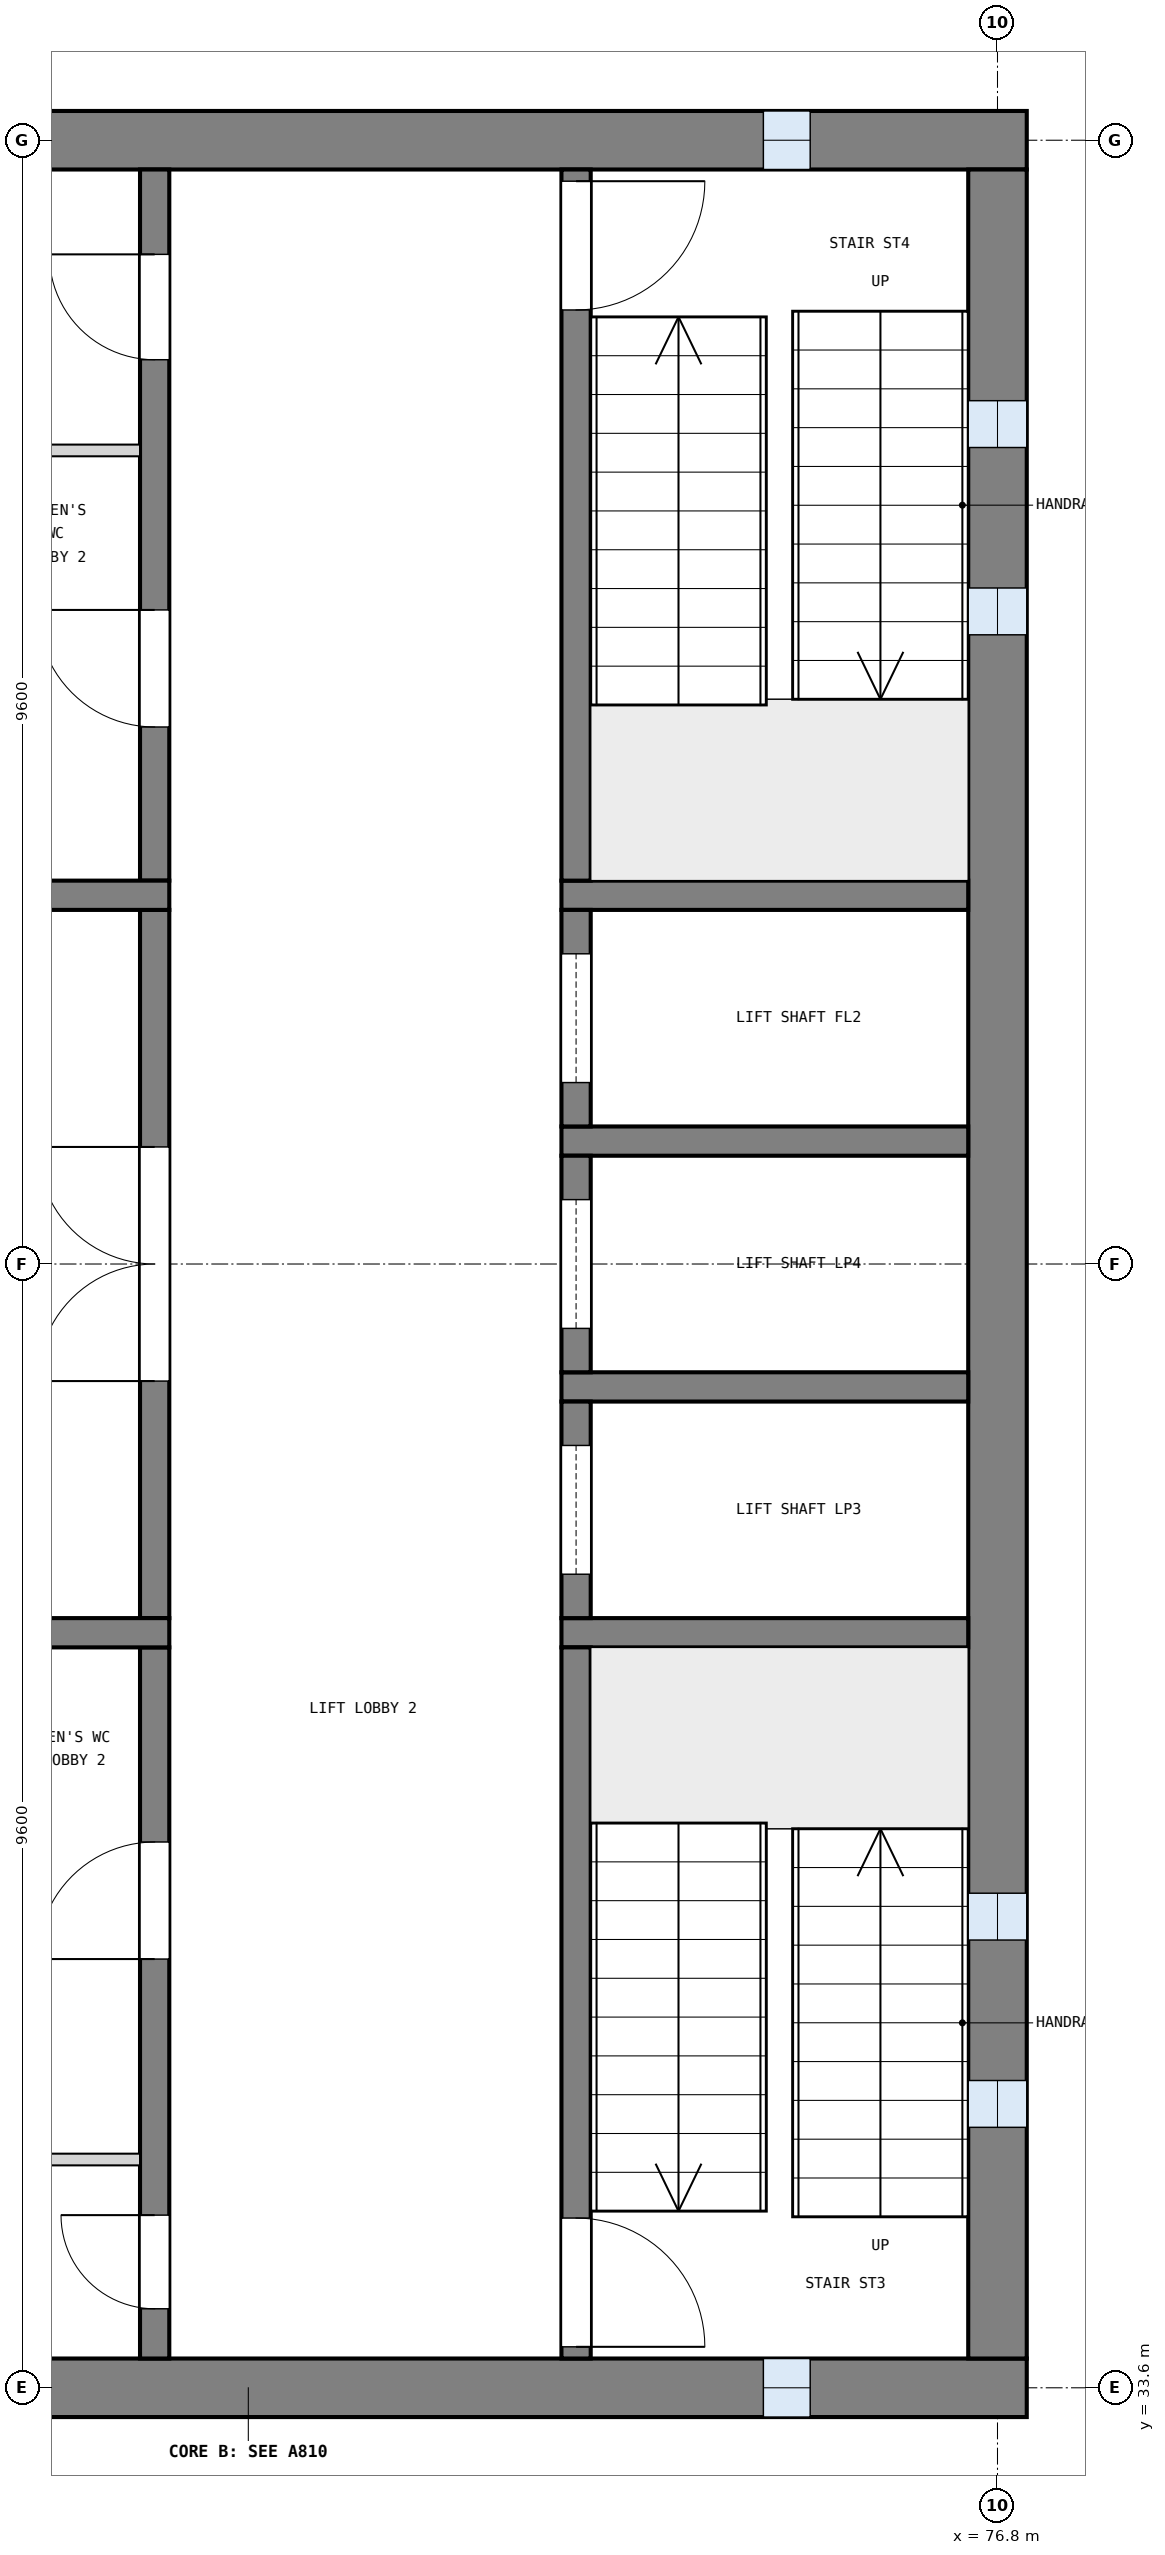
"""IFC4 building model, lengths in metres.
Left out: names, types, materials, properties, quantities, classifications, styles, units other than length and angle.
Written with IfcOpenShell. Run it as: python <this file> out.ifc"""

import sys

from ifc_helpers import new_model, si_unit, direction, frame, frame_2d, origin, place, context, subcontext, project, spatial, rectangle, extrude, element, fill, save


model = new_model("IFC4")
c1 = context("Model", 3, precision=1e-05, world=origin(), true_north=direction((0.0, 1.0)))
c2 = subcontext(c1, "Body", "Model", "MODEL_VIEW")
j1 = project(units=[si_unit("LENGTHUNIT", "METRE"), si_unit("PLANEANGLEUNIT", "RADIAN")], contexts=[c1])
p1 = place(None, origin())
s1 = spatial("IfcSite", under=j1, at=p1, CompositionType="ELEMENT")
p2 = place(p1, origin())
s2 = spatial("IfcBuilding", under=s1, at=p2, CompositionType="ELEMENT")
p3 = place(p2, frame((0.0, 0.0, 32.7)))
s3 = spatial("IfcBuildingStorey", under=s2, at=p3, CompositionType="ELEMENT", Elevation=32.7)
p4 = place(p3, frame((63.75, 52.8, 0.0), z_axis=(0.0, 0.0, 1.0), x_axis=(1.0, 0.0, 0.0)))
e1 = element("IfcWall", 1, at=p4, inside=s3, PredefinedType="SHEAR", context=c2, shape_type="SweptSolid", body=[
    extrude(rectangle(XDim=13.3, YDim=0.5, at=frame_2d((6.65, 0.0))), origin(), (0.0, 0.0, 1.0), 3.9),
])
p5 = place(p4, frame((11.05, 0.0, 1.0)))
e2 = element("IfcOpeningElement", 2, at=p5, cuts=e1, PredefinedType="OPENING", context=c2, shape_type="SweptSolid", body=[
    extrude(rectangle(XDim=0.4, YDim=2.0, at=frame_2d((0.2, 1.0))), frame((0.0, 0.26, 0.0), z_axis=(0.0, -1.0, 0.0), x_axis=(1.0, 0.0, 0.0)), (0.0, 0.0, 1.0), 0.52),
])
p6 = place(p3, frame((63.75, 33.6, 0.0), z_axis=(0.0, 0.0, 1.0), x_axis=(1.0, 0.0, 0.0)))
e3 = element("IfcWall", 3, at=p6, inside=s3, PredefinedType="SHEAR", context=c2, shape_type="SweptSolid", body=[
    extrude(rectangle(XDim=13.3, YDim=0.5, at=frame_2d((6.65, 0.0))), origin(), (0.0, 0.0, 1.0), 3.9),
])
p7 = place(p6, frame((11.05, 0.0, 1.0)))
e4 = element("IfcOpeningElement", 4, at=p7, cuts=e3, PredefinedType="OPENING", context=c2, shape_type="SweptSolid", body=[
    extrude(rectangle(XDim=0.4, YDim=2.0, at=frame_2d((0.2, 1.0))), frame((0.0, 0.26, 0.0), z_axis=(0.0, -1.0, 0.0), x_axis=(1.0, 0.0, 0.0)), (0.0, 0.0, 1.0), 0.52),
])
p8 = place(p3, frame((76.8, 33.85, 0.0), z_axis=(0.0, 0.0, 1.0), x_axis=(0.0, 1.0, 0.0)))
e5 = element("IfcWall", 5, at=p8, inside=s3, PredefinedType="SHEAR", context=c2, shape_type="SweptSolid", body=[
    extrude(rectangle(XDim=18.7, YDim=0.5, at=frame_2d((9.35, 0.0))), origin(), (0.0, 0.0, 1.0), 3.9),
])
p9 = place(p8, frame((1.975, 0.0, 1.0)))
e6 = element("IfcOpeningElement", 6, at=p9, cuts=e5, PredefinedType="OPENING", context=c2, shape_type="SweptSolid", body=[
    extrude(rectangle(XDim=0.4, YDim=2.0, at=frame_2d((0.2, 1.0))), frame((0.0, 0.26, 0.0), z_axis=(0.0, -1.0, 0.0), x_axis=(1.0, 0.0, 0.0)), (0.0, 0.0, 1.0), 0.52),
])
p10 = place(p8, frame((3.575, 0.0, 1.0)))
e7 = element("IfcOpeningElement", 7, at=p10, cuts=e5, PredefinedType="OPENING", context=c2, shape_type="SweptSolid", body=[
    extrude(rectangle(XDim=0.4, YDim=2.0, at=frame_2d((0.2, 1.0))), frame((0.0, 0.26, 0.0), z_axis=(0.0, -1.0, 0.0), x_axis=(1.0, 0.0, 0.0)), (0.0, 0.0, 1.0), 0.52),
])
p11 = place(p8, frame((14.725, 0.0, 1.0)))
e8 = element("IfcOpeningElement", 8, at=p11, cuts=e5, PredefinedType="OPENING", context=c2, shape_type="SweptSolid", body=[
    extrude(rectangle(XDim=0.4, YDim=2.0, at=frame_2d((0.2, 1.0))), frame((0.0, 0.26, 0.0), z_axis=(0.0, -1.0, 0.0), x_axis=(1.0, 0.0, 0.0)), (0.0, 0.0, 1.0), 0.52),
])
p12 = place(p8, frame((16.325, 0.0, 1.0)))
e9 = element("IfcOpeningElement", 9, at=p12, cuts=e5, PredefinedType="OPENING", context=c2, shape_type="SweptSolid", body=[
    extrude(rectangle(XDim=0.4, YDim=2.0, at=frame_2d((0.2, 1.0))), frame((0.0, 0.26, 0.0), z_axis=(0.0, -1.0, 0.0), x_axis=(1.0, 0.0, 0.0)), (0.0, 0.0, 1.0), 0.52),
])
for number, where, z_axis, x_axis in (
    (10, (76.55, 40.05, 0.0), (0.0, 0.0, 1.0), (-1.0, 0.0, 0.0)),
    (11, (76.55, 42.15, 0.0), (0.0, 0.0, 1.0), (-1.0, 0.0, 0.0)),
    (12, (76.55, 44.25, 0.0), (0.0, 0.0, 1.0), (-1.0, 0.0, 0.0)),
    (13, (76.55, 46.35, 0.0), (0.0, 0.0, 1.0), (-1.0, 0.0, 0.0)),
):
    element("IfcWall", number, at=place(p3, frame(where, z_axis=z_axis, x_axis=x_axis)), inside=s3, PredefinedType="SOLIDWALL", context=c2, shape_type="SweptSolid", body=[
        extrude(rectangle(XDim=3.475, YDim=0.25, at=frame_2d((1.738, 0.0))), origin(), (0.0, 0.0, 1.0), 3.6),
    ])
p13 = place(p3, frame((73.2, 33.85, 0.0), z_axis=(0.0, 0.0, 1.0), x_axis=(0.0, 1.0, 0.0)))
e14 = element("IfcWall", 14, at=p13, inside=s3, PredefinedType="SOLIDWALL", context=c2, shape_type="SweptSolid", body=[
    extrude(rectangle(XDim=6.075, YDim=0.25, at=frame_2d((3.038, 0.0))), origin(), (0.0, 0.0, 1.0), 3.6),
])
p14 = place(p13, frame((0.1, 0.0, 0.0)))
e15 = element("IfcOpeningElement", 15, at=p14, cuts=e14, PredefinedType="OPENING", context=c2, shape_type="SweptSolid", body=[
    extrude(rectangle(XDim=1.1, YDim=2.1, at=frame_2d((0.55, 1.05))), frame((0.0, 0.135, 0.0), z_axis=(0.0, -1.0, 0.0), x_axis=(1.0, 0.0, 0.0)), (0.0, 0.0, 1.0), 0.27),
])
p15 = place(p3, frame((73.2, 40.175, 0.0), z_axis=(0.0, 0.0, 1.0), x_axis=(0.0, 1.0, 0.0)))
e16 = element("IfcWall", 16, at=p15, inside=s3, PredefinedType="SOLIDWALL", context=c2, shape_type="SweptSolid", body=[
    extrude(rectangle(XDim=1.85, YDim=0.25, at=frame_2d((0.925, 0.0))), origin(), (0.0, 0.0, 1.0), 3.6),
])
p16 = place(p15, frame((0.375, 0.0, 0.0)))
e17 = element("IfcOpeningElement", 17, at=p16, cuts=e16, PredefinedType="OPENING", context=c2, shape_type="SweptSolid", body=[
    extrude(rectangle(XDim=1.1, YDim=2.1, at=frame_2d((0.55, 1.05))), frame((0.0, 0.135, 0.0), z_axis=(0.0, -1.0, 0.0), x_axis=(1.0, 0.0, 0.0)), (0.0, 0.0, 1.0), 0.27),
])
p17 = place(p3, frame((73.2, 42.275, 0.0), z_axis=(0.0, 0.0, 1.0), x_axis=(0.0, 1.0, 0.0)))
e18 = element("IfcWall", 18, at=p17, inside=s3, PredefinedType="SOLIDWALL", context=c2, shape_type="SweptSolid", body=[
    extrude(rectangle(XDim=1.85, YDim=0.25, at=frame_2d((0.925, 0.0))), origin(), (0.0, 0.0, 1.0), 3.6),
])
p18 = place(p17, frame((0.375, 0.0, 0.0)))
e19 = element("IfcOpeningElement", 19, at=p18, cuts=e18, PredefinedType="OPENING", context=c2, shape_type="SweptSolid", body=[
    extrude(rectangle(XDim=1.1, YDim=2.1, at=frame_2d((0.55, 1.05))), frame((0.0, 0.135, 0.0), z_axis=(0.0, -1.0, 0.0), x_axis=(1.0, 0.0, 0.0)), (0.0, 0.0, 1.0), 0.27),
])
p19 = place(p3, frame((73.2, 44.375, 0.0), z_axis=(0.0, 0.0, 1.0), x_axis=(0.0, 1.0, 0.0)))
e20 = element("IfcWall", 20, at=p19, inside=s3, PredefinedType="SOLIDWALL", context=c2, shape_type="SweptSolid", body=[
    extrude(rectangle(XDim=1.85, YDim=0.25, at=frame_2d((0.925, 0.0))), origin(), (0.0, 0.0, 1.0), 3.6),
])
p20 = place(p19, frame((0.375, 0.0, 0.0)))
e21 = element("IfcOpeningElement", 21, at=p20, cuts=e20, PredefinedType="OPENING", context=c2, shape_type="SweptSolid", body=[
    extrude(rectangle(XDim=1.1, YDim=2.1, at=frame_2d((0.55, 1.05))), frame((0.0, 0.135, 0.0), z_axis=(0.0, -1.0, 0.0), x_axis=(1.0, 0.0, 0.0)), (0.0, 0.0, 1.0), 0.27),
])
p21 = place(p3, frame((73.2, 46.475, 0.0), z_axis=(0.0, 0.0, 1.0), x_axis=(0.0, 1.0, 0.0)))
e22 = element("IfcWall", 22, at=p21, inside=s3, PredefinedType="SOLIDWALL", context=c2, shape_type="SweptSolid", body=[
    extrude(rectangle(XDim=6.075, YDim=0.25, at=frame_2d((3.038, 0.0))), origin(), (0.0, 0.0, 1.0), 3.6),
])
p22 = place(p21, frame((4.875, 0.0, 0.0)))
e23 = element("IfcOpeningElement", 23, at=p22, cuts=e22, PredefinedType="OPENING", context=c2, shape_type="SweptSolid", body=[
    extrude(rectangle(XDim=1.1, YDim=2.1, at=frame_2d((0.55, 1.05))), frame((0.0, 0.135, 0.0), z_axis=(0.0, -1.0, 0.0), x_axis=(1.0, 0.0, 0.0)), (0.0, 0.0, 1.0), 0.27),
])
p23 = place(p3, frame((69.6, 33.85, 0.0), z_axis=(0.0, 0.0, 1.0), x_axis=(0.0, 1.0, 0.0)))
e24 = element("IfcWall", 24, at=p23, inside=s3, PredefinedType="SOLIDWALL", context=c2, shape_type="SweptSolid", body=[
    extrude(rectangle(XDim=6.075, YDim=0.25, at=frame_2d((3.038, 0.0))), origin(), (0.0, 0.0, 1.0), 3.6),
])
p24 = place(p23, frame((0.425, 0.0, 0.0)))
e25 = element("IfcOpeningElement", 25, at=p24, cuts=e24, PredefinedType="OPENING", context=c2, shape_type="SweptSolid", body=[
    extrude(rectangle(XDim=0.8, YDim=2.1, at=frame_2d((0.4, 1.05))), frame((0.0, 0.135, 0.0), z_axis=(0.0, -1.0, 0.0), x_axis=(1.0, 0.0, 0.0)), (0.0, 0.0, 1.0), 0.27),
])
p25 = place(p23, frame((3.413, 0.0, 0.0)))
e26 = element("IfcOpeningElement", 26, at=p25, cuts=e24, PredefinedType="OPENING", context=c2, shape_type="SweptSolid", body=[
    extrude(rectangle(XDim=1.0, YDim=2.1, at=frame_2d((0.5, 1.05))), frame((0.0, 0.135, 0.0), z_axis=(0.0, -1.0, 0.0), x_axis=(1.0, 0.0, 0.0)), (0.0, 0.0, 1.0), 0.27),
])
p26 = place(p3, frame((69.6, 40.175, 0.0), z_axis=(0.0, 0.0, 1.0), x_axis=(0.0, 1.0, 0.0)))
e27 = element("IfcWall", 27, at=p26, inside=s3, PredefinedType="SOLIDWALL", context=c2, shape_type="SweptSolid", body=[
    extrude(rectangle(XDim=6.05, YDim=0.25, at=frame_2d((3.025, 0.0))), origin(), (0.0, 0.0, 1.0), 3.6),
])
p27 = place(p26, frame((2.025, 0.0, 0.0)))
e28 = element("IfcOpeningElement", 28, at=p27, cuts=e27, PredefinedType="OPENING", context=c2, shape_type="SweptSolid", body=[
    extrude(rectangle(XDim=2.0, YDim=2.1, at=frame_2d((1.0, 1.05))), frame((0.0, 0.135, 0.0), z_axis=(0.0, -1.0, 0.0), x_axis=(1.0, 0.0, 0.0)), (0.0, 0.0, 1.0), 0.27),
])
p28 = place(p3, frame((69.6, 46.475, 0.0), z_axis=(0.0, 0.0, 1.0), x_axis=(0.0, 1.0, 0.0)))
e29 = element("IfcWall", 29, at=p28, inside=s3, PredefinedType="SOLIDWALL", context=c2, shape_type="SweptSolid", body=[
    extrude(rectangle(XDim=6.075, YDim=0.25, at=frame_2d((3.038, 0.0))), origin(), (0.0, 0.0, 1.0), 3.6),
])
p29 = place(p28, frame((1.312, 0.0, 0.0)))
e30 = element("IfcOpeningElement", 30, at=p29, cuts=e29, PredefinedType="OPENING", context=c2, shape_type="SweptSolid", body=[
    extrude(rectangle(XDim=1.0, YDim=2.1, at=frame_2d((0.5, 1.05))), frame((0.0, 0.135, 0.0), z_axis=(0.0, -1.0, 0.0), x_axis=(1.0, 0.0, 0.0)), (0.0, 0.0, 1.0), 0.27),
])
p30 = place(p28, frame((4.45, 0.0, 0.0)))
e31 = element("IfcOpeningElement", 31, at=p30, cuts=e29, PredefinedType="OPENING", context=c2, shape_type="SweptSolid", body=[
    extrude(rectangle(XDim=0.9, YDim=2.1, at=frame_2d((0.45, 1.05))), frame((0.0, 0.135, 0.0), z_axis=(0.0, -1.0, 0.0), x_axis=(1.0, 0.0, 0.0)), (0.0, 0.0, 1.0), 0.27),
])
for number, where, z_axis, x_axis in (
    (32, (69.725, 40.05, 0.0), (0.0, 0.0, 1.0), (-1.0, 0.0, 0.0)),
    (33, (69.725, 46.35, 0.0), (0.0, 0.0, 1.0), (-1.0, 0.0, 0.0)),
):
    element("IfcWall", number, at=place(p3, frame(where, z_axis=z_axis, x_axis=x_axis)), inside=s3, PredefinedType="SOLIDWALL", context=c2, shape_type="SweptSolid", body=[
        extrude(rectangle(XDim=5.475, YDim=0.25, at=frame_2d((2.738, 0.0))), origin(), (0.0, 0.0, 1.0), 3.6),
    ])
for number, where, z_axis, x_axis in (
    (34, (69.475, 35.55, 0.0), (0.0, 0.0, 1.0), (-1.0, 0.0, 0.0)),
    (35, (69.475, 50.15, 0.0), (0.0, 0.0, 1.0), (-1.0, 0.0, 0.0)),
):
    element("IfcWall", number, at=place(p3, frame(where, z_axis=z_axis, x_axis=x_axis)), inside=s3, PredefinedType="PARTITIONING", context=c2, shape_type="SweptSolid", body=[
        extrude(rectangle(XDim=5.225, YDim=0.1, at=frame_2d((2.613, 0.0))), origin(), (0.0, 0.0, 1.0), 3.6),
    ])
p31 = place(p9, origin())
e36 = element("IfcWindow", 36, at=p31, inside=s3, PartitioningType="SINGLE_PANEL", PredefinedType="WINDOW", context=c2, shape_type="SweptSolid", body=[
    extrude(rectangle(XDim=0.4, YDim=2.0, at=frame_2d((0.2, 1.0))), frame((0.0, 0.03, 0.0), z_axis=(0.0, -1.0, 0.0), x_axis=(1.0, 0.0, 0.0)), (0.0, 0.0, 1.0), 0.06),
])
fill(e6, e36)
p32 = place(p10, origin())
e37 = element("IfcWindow", 37, at=p32, inside=s3, PartitioningType="SINGLE_PANEL", PredefinedType="WINDOW", context=c2, shape_type="SweptSolid", body=[
    extrude(rectangle(XDim=0.4, YDim=2.0, at=frame_2d((0.2, 1.0))), frame((0.0, 0.03, 0.0), z_axis=(0.0, -1.0, 0.0), x_axis=(1.0, 0.0, 0.0)), (0.0, 0.0, 1.0), 0.06),
])
fill(e7, e37)
p33 = place(p11, origin())
e38 = element("IfcWindow", 38, at=p33, inside=s3, PartitioningType="SINGLE_PANEL", PredefinedType="WINDOW", context=c2, shape_type="SweptSolid", body=[
    extrude(rectangle(XDim=0.4, YDim=2.0, at=frame_2d((0.2, 1.0))), frame((0.0, 0.03, 0.0), z_axis=(0.0, -1.0, 0.0), x_axis=(1.0, 0.0, 0.0)), (0.0, 0.0, 1.0), 0.06),
])
fill(e8, e38)
p34 = place(p12, origin())
e39 = element("IfcWindow", 39, at=p34, inside=s3, PartitioningType="SINGLE_PANEL", PredefinedType="WINDOW", context=c2, shape_type="SweptSolid", body=[
    extrude(rectangle(XDim=0.4, YDim=2.0, at=frame_2d((0.2, 1.0))), frame((0.0, 0.03, 0.0), z_axis=(0.0, -1.0, 0.0), x_axis=(1.0, 0.0, 0.0)), (0.0, 0.0, 1.0), 0.06),
])
fill(e9, e39)
p35 = place(p7, origin())
e40 = element("IfcWindow", 40, at=p35, inside=s3, PartitioningType="SINGLE_PANEL", PredefinedType="WINDOW", context=c2, shape_type="SweptSolid", body=[
    extrude(rectangle(XDim=0.4, YDim=2.0, at=frame_2d((0.2, 1.0))), frame((0.0, 0.03, 0.0), z_axis=(0.0, -1.0, 0.0), x_axis=(1.0, 0.0, 0.0)), (0.0, 0.0, 1.0), 0.06),
])
fill(e4, e40)
p36 = place(p5, origin())
e41 = element("IfcWindow", 41, at=p36, inside=s3, PartitioningType="SINGLE_PANEL", PredefinedType="WINDOW", context=c2, shape_type="SweptSolid", body=[
    extrude(rectangle(XDim=0.4, YDim=2.0, at=frame_2d((0.2, 1.0))), frame((0.0, 0.03, 0.0), z_axis=(0.0, -1.0, 0.0), x_axis=(1.0, 0.0, 0.0)), (0.0, 0.0, 1.0), 0.06),
])
fill(e2, e41)
p37 = place(p14, frame((1.1, 0.0, 0.0), z_axis=(0.0, 0.0, 1.0), x_axis=(-1.0, 0.0, 0.0)))
e42 = element("IfcDoor", 42, at=p37, inside=s3, OperationType="SINGLE_SWING_RIGHT", PredefinedType="DOOR", context=c2, shape_type="SweptSolid", body=[
    extrude(rectangle(XDim=1.1, YDim=2.1, at=frame_2d((0.55, 1.05))), frame((0.0, 0.025, 0.0), z_axis=(0.0, -1.0, 0.0), x_axis=(1.0, 0.0, 0.0)), (0.0, 0.0, 1.0), 0.05),
])
fill(e15, e42)
p38 = place(p22, frame((1.1, 0.0, 0.0), z_axis=(0.0, 0.0, 1.0), x_axis=(-1.0, 0.0, 0.0)))
e43 = element("IfcDoor", 43, at=p38, inside=s3, OperationType="SINGLE_SWING_LEFT", PredefinedType="DOOR", context=c2, shape_type="SweptSolid", body=[
    extrude(rectangle(XDim=1.1, YDim=2.1, at=frame_2d((0.55, 1.05))), frame((0.0, 0.025, 0.0), z_axis=(0.0, -1.0, 0.0), x_axis=(1.0, 0.0, 0.0)), (0.0, 0.0, 1.0), 0.05),
])
fill(e23, e43)
p39 = place(p16, origin())
e44 = element("IfcDoor", 44, at=p39, inside=s3, OperationType="SLIDING_TO_LEFT", PredefinedType="DOOR", context=c2, shape_type="SweptSolid", body=[
    extrude(rectangle(XDim=1.1, YDim=2.1, at=frame_2d((0.55, 1.05))), frame((0.0, 0.025, 0.0), z_axis=(0.0, -1.0, 0.0), x_axis=(1.0, 0.0, 0.0)), (0.0, 0.0, 1.0), 0.05),
])
fill(e17, e44)
p40 = place(p18, origin())
e45 = element("IfcDoor", 45, at=p40, inside=s3, OperationType="SLIDING_TO_LEFT", PredefinedType="DOOR", context=c2, shape_type="SweptSolid", body=[
    extrude(rectangle(XDim=1.1, YDim=2.1, at=frame_2d((0.55, 1.05))), frame((0.0, 0.025, 0.0), z_axis=(0.0, -1.0, 0.0), x_axis=(1.0, 0.0, 0.0)), (0.0, 0.0, 1.0), 0.05),
])
fill(e19, e45)
p41 = place(p20, origin())
e46 = element("IfcDoor", 46, at=p41, inside=s3, OperationType="SLIDING_TO_LEFT", PredefinedType="DOOR", context=c2, shape_type="SweptSolid", body=[
    extrude(rectangle(XDim=1.1, YDim=2.1, at=frame_2d((0.55, 1.05))), frame((0.0, 0.025, 0.0), z_axis=(0.0, -1.0, 0.0), x_axis=(1.0, 0.0, 0.0)), (0.0, 0.0, 1.0), 0.05),
])
fill(e21, e46)
p42 = place(p27, origin())
e47 = element("IfcDoor", 47, at=p42, inside=s3, OperationType="DOUBLE_DOOR_SINGLE_SWING", PredefinedType="DOOR", context=c2, shape_type="SweptSolid", body=[
    extrude(rectangle(XDim=2.0, YDim=2.1, at=frame_2d((1.0, 1.05))), frame((0.0, 0.025, 0.0), z_axis=(0.0, -1.0, 0.0), x_axis=(1.0, 0.0, 0.0)), (0.0, 0.0, 1.0), 0.05),
])
fill(e28, e47)
p43 = place(p24, origin())
e48 = element("IfcDoor", 48, at=p43, inside=s3, OperationType="SINGLE_SWING_RIGHT", PredefinedType="DOOR", context=c2, shape_type="SweptSolid", body=[
    extrude(rectangle(XDim=0.8, YDim=2.1, at=frame_2d((0.4, 1.05))), frame((0.0, 0.025, 0.0), z_axis=(0.0, -1.0, 0.0), x_axis=(1.0, 0.0, 0.0)), (0.0, 0.0, 1.0), 0.05),
])
fill(e25, e48)
p44 = place(p25, origin())
e49 = element("IfcDoor", 49, at=p44, inside=s3, OperationType="SINGLE_SWING_LEFT", PredefinedType="DOOR", context=c2, shape_type="SweptSolid", body=[
    extrude(rectangle(XDim=1.0, YDim=2.1, at=frame_2d((0.5, 1.05))), frame((0.0, 0.025, 0.0), z_axis=(0.0, -1.0, 0.0), x_axis=(1.0, 0.0, 0.0)), (0.0, 0.0, 1.0), 0.05),
])
fill(e26, e49)
p45 = place(p29, origin())
e50 = element("IfcDoor", 50, at=p45, inside=s3, OperationType="SINGLE_SWING_RIGHT", PredefinedType="DOOR", context=c2, shape_type="SweptSolid", body=[
    extrude(rectangle(XDim=1.0, YDim=2.1, at=frame_2d((0.5, 1.05))), frame((0.0, 0.025, 0.0), z_axis=(0.0, -1.0, 0.0), x_axis=(1.0, 0.0, 0.0)), (0.0, 0.0, 1.0), 0.05),
])
fill(e30, e50)
p46 = place(p30, origin())
e51 = element("IfcDoor", 51, at=p46, inside=s3, OperationType="SINGLE_SWING_RIGHT", PredefinedType="DOOR", context=c2, shape_type="SweptSolid", body=[
    extrude(rectangle(XDim=0.9, YDim=2.1, at=frame_2d((0.45, 1.05))), frame((0.0, 0.025, 0.0), z_axis=(0.0, -1.0, 0.0), x_axis=(1.0, 0.0, 0.0)), (0.0, 0.0, 1.0), 0.05),
])
fill(e31, e51)
save(model, sys.argv[1])
